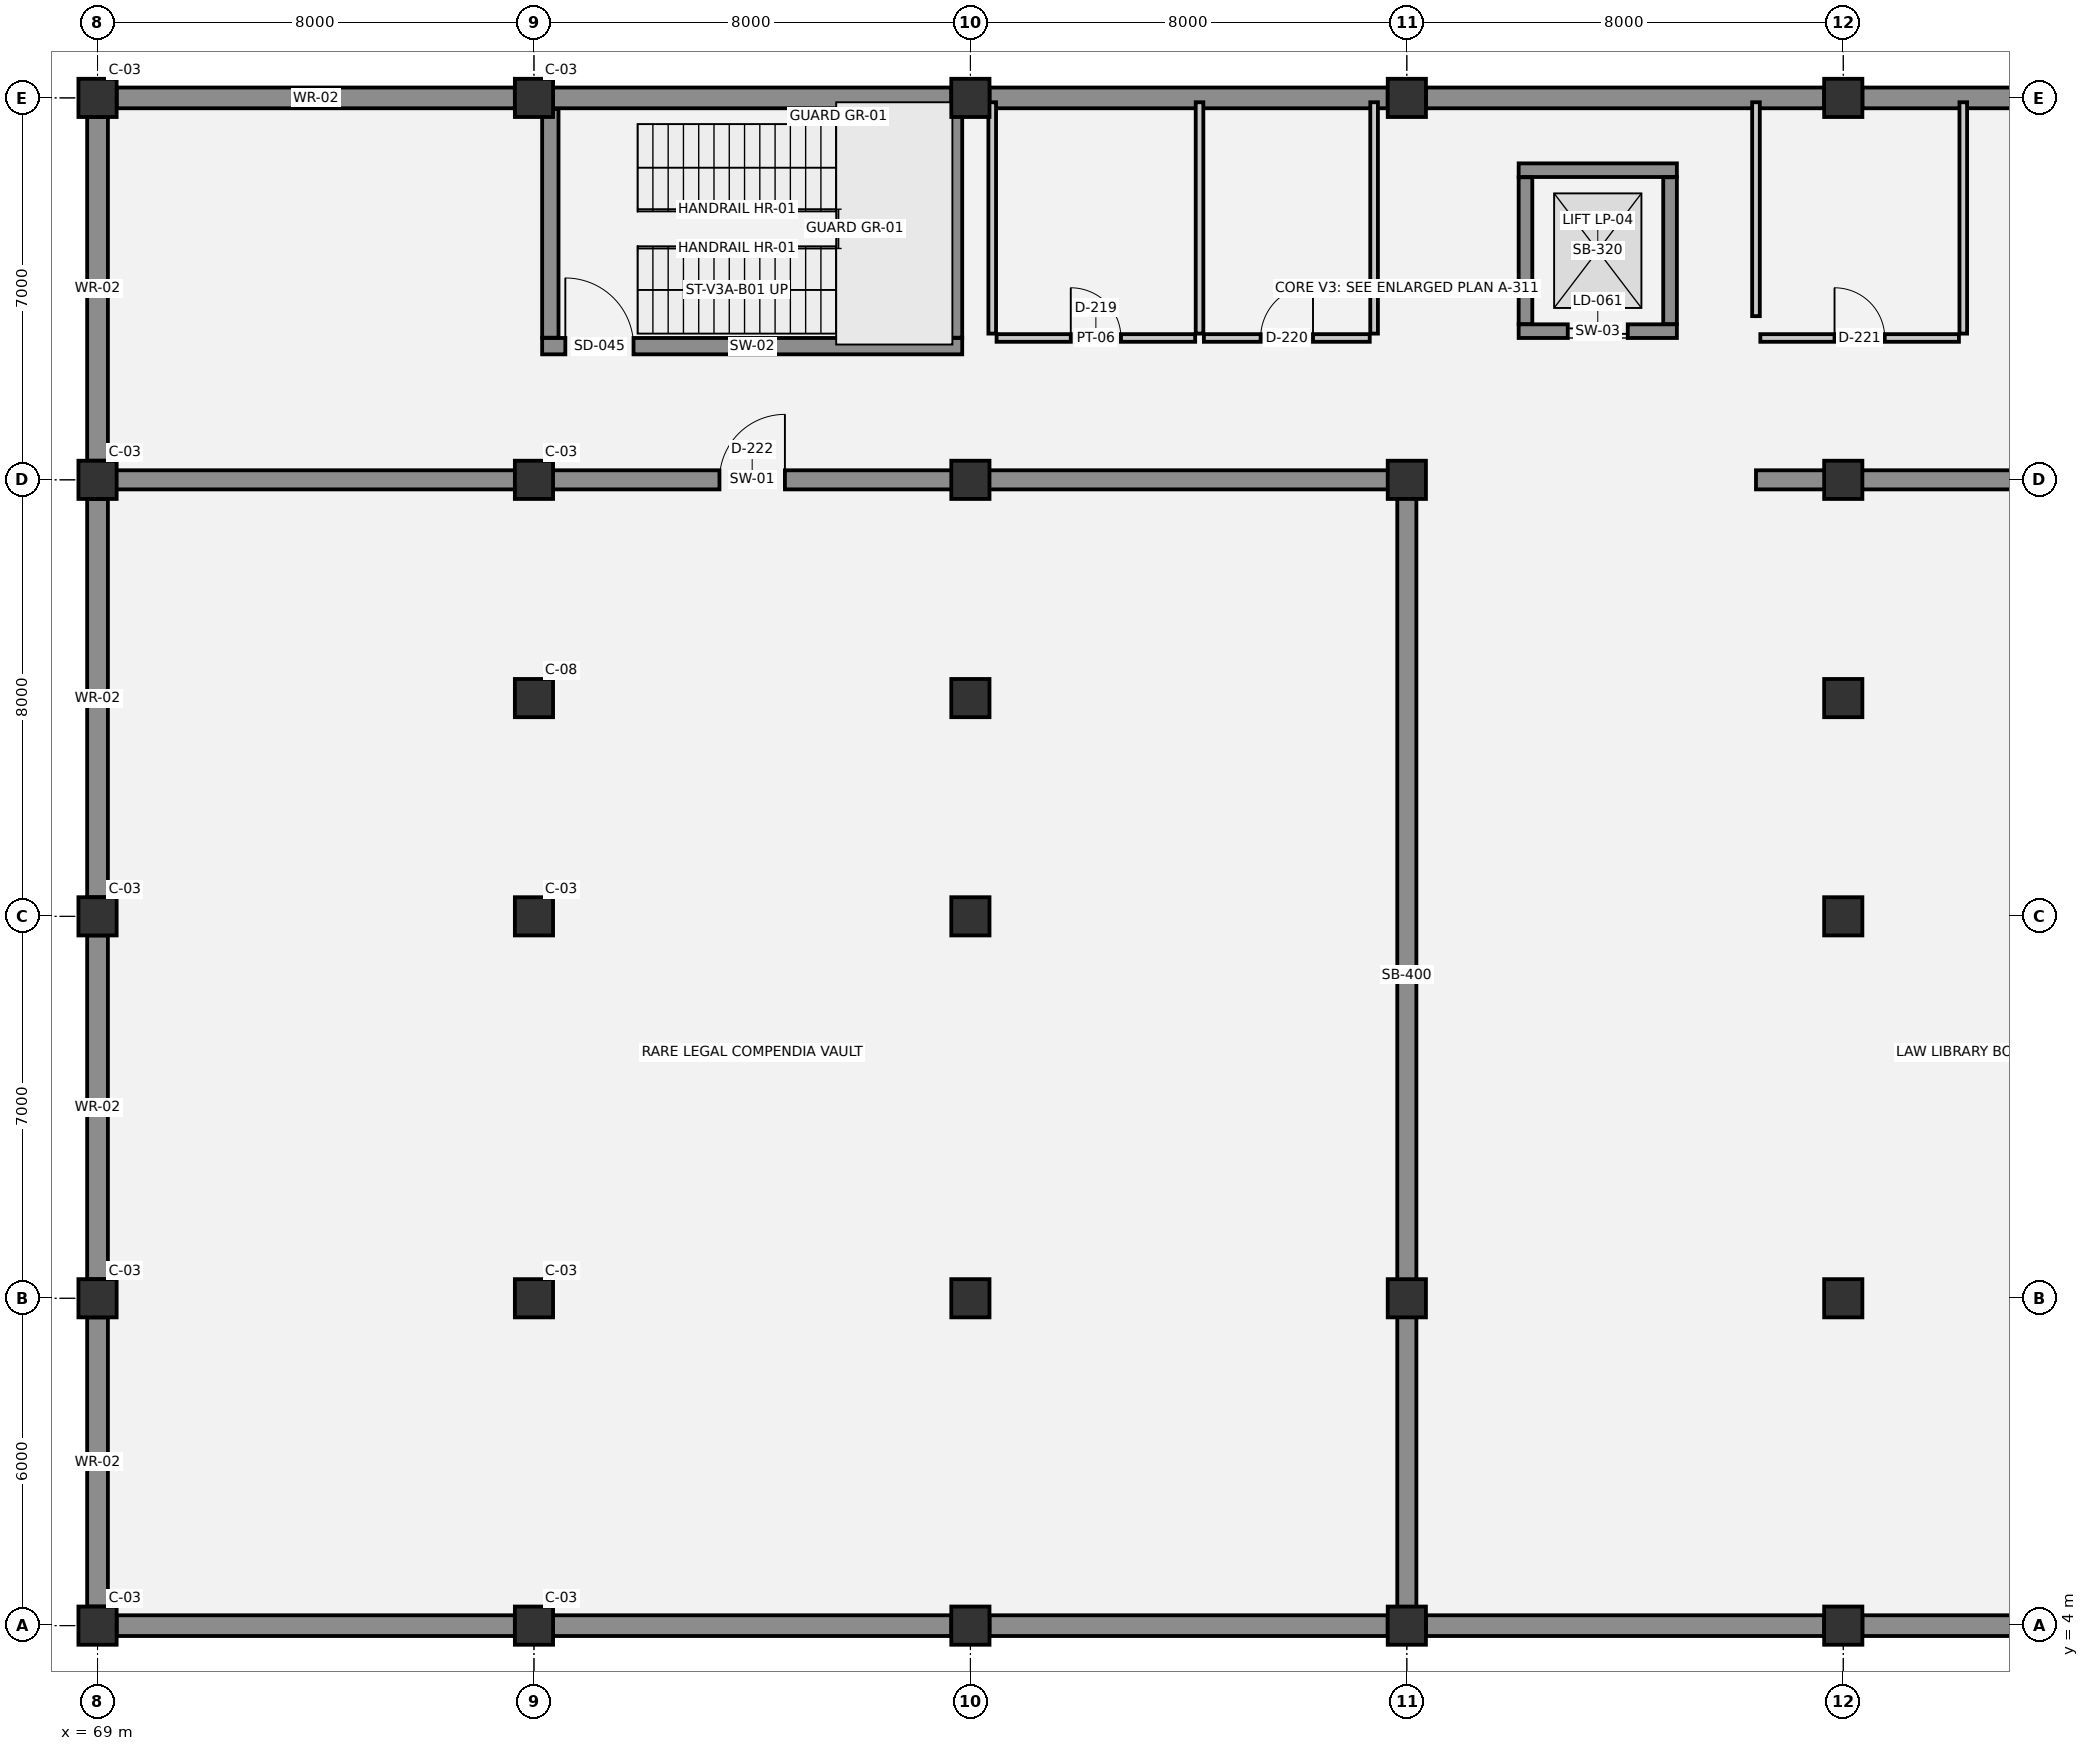
"""IFC4 building model, lengths in metres.
Left out: names, types, materials, properties, quantities, classifications, styles, units other than length and angle.
Written with IfcOpenShell. Run it as: python <this file> out.ifc"""

import sys

from ifc_helpers import new_model, si_unit, direction, frame, frame_2d, origin, origin_2d, place, context, subcontext, project, spatial, rectangle, circle, extrude, element, fill, save


model = new_model("IFC4")
c1 = context("Model", 3, precision=1e-05, world=origin(), true_north=direction((0.0, 1.0)))
c2 = subcontext(c1, "Body", "Model", "MODEL_VIEW")
j1 = project(units=[si_unit("LENGTHUNIT", "METRE"), si_unit("PLANEANGLEUNIT", "RADIAN")], contexts=[c1])
p1 = place(None, origin())
s1 = spatial("IfcSite", under=j1, at=p1, CompositionType="ELEMENT")
p2 = place(p1, origin())
s2 = spatial("IfcBuilding", under=s1, at=p2, CompositionType="ELEMENT")
p3 = place(p2, frame((0.0, 0.0, -4.5)))
s3 = spatial("IfcBuildingStorey", under=s2, at=p3, CompositionType="ELEMENT", Elevation=-4.5)
for number, where, z_axis, x_axis in (
    (1, (69.0, 4.0, 0.0), (0.0, 0.0, 1.0), (1.0, 0.0, 0.0)),
    (2, (69.0, 10.0, 0.0), (0.0, 0.0, 1.0), (1.0, 0.0, 0.0)),
    (3, (69.0, 17.0, 0.0), (0.0, 0.0, 1.0), (1.0, 0.0, 0.0)),
    (4, (69.0, 25.0, 0.0), (0.0, 0.0, 1.0), (1.0, 0.0, 0.0)),
    (5, (69.0, 32.0, 0.0), (0.0, 0.0, 1.0), (1.0, 0.0, 0.0)),
    (6, (77.0, 4.0, 0.0), (0.0, 0.0, 1.0), (1.0, 0.0, 0.0)),
    (7, (77.0, 10.0, 0.0), (0.0, 0.0, 1.0), (1.0, 0.0, 0.0)),
    (8, (77.0, 17.0, 0.0), (0.0, 0.0, 1.0), (1.0, 0.0, 0.0)),
    (9, (77.0, 25.0, 0.0), (0.0, 0.0, 1.0), (1.0, 0.0, 0.0)),
    (10, (77.0, 32.0, 0.0), (0.0, 0.0, 1.0), (1.0, 0.0, 0.0)),
    (11, (85.0, 4.0, 0.0), (0.0, 0.0, 1.0), (1.0, 0.0, 0.0)),
    (12, (85.0, 10.0, 0.0), (0.0, 0.0, 1.0), (1.0, 0.0, 0.0)),
    (13, (85.0, 17.0, 0.0), (0.0, 0.0, 1.0), (1.0, 0.0, 0.0)),
    (14, (85.0, 25.0, 0.0), (0.0, 0.0, 1.0), (1.0, 0.0, 0.0)),
    (15, (85.0, 32.0, 0.0), (0.0, 0.0, 1.0), (1.0, 0.0, 0.0)),
    (16, (93.0, 4.0, 0.0), (0.0, 0.0, 1.0), (1.0, 0.0, 0.0)),
    (17, (93.0, 10.0, 0.0), (0.0, 0.0, 1.0), (1.0, 0.0, 0.0)),
    (18, (93.0, 25.0, 0.0), (0.0, 0.0, 1.0), (1.0, 0.0, 0.0)),
    (19, (93.0, 32.0, 0.0), (0.0, 0.0, 1.0), (1.0, 0.0, 0.0)),
    (20, (101.0, 4.0, 0.0), (0.0, 0.0, 1.0), (1.0, 0.0, 0.0)),
    (21, (101.0, 10.0, 0.0), (0.0, 0.0, 1.0), (1.0, 0.0, 0.0)),
    (22, (101.0, 17.0, 0.0), (0.0, 0.0, 1.0), (1.0, 0.0, 0.0)),
    (23, (101.0, 25.0, 0.0), (0.0, 0.0, 1.0), (1.0, 0.0, 0.0)),
    (24, (101.0, 32.0, 0.0), (0.0, 0.0, 1.0), (1.0, 0.0, 0.0)),
):
    element("IfcColumn", number, at=place(p3, frame(where, z_axis=z_axis, x_axis=x_axis)), inside=s3, PredefinedType="COLUMN", context=c2, shape_type="SweptSolid", body=[
        extrude(rectangle(XDim=0.7, YDim=0.7, at=origin_2d()), origin(), (0.0, 0.0, 1.0), 4.5),
    ])
for number, where, z_axis, x_axis in (
    (25, (77.0, 21.0, 0.0), (0.0, 0.0, 1.0), (1.0, 0.0, 0.0)),
    (26, (85.0, 21.0, 0.0), (0.0, 0.0, 1.0), (1.0, 0.0, 0.0)),
    (27, (101.0, 21.0, 0.0), (0.0, 0.0, 1.0), (1.0, 0.0, 0.0)),
):
    element("IfcColumn", number, at=place(p3, frame(where, z_axis=z_axis, x_axis=x_axis)), inside=s3, PredefinedType="COLUMN", context=c2, shape_type="SweptSolid", body=[
        extrude(circle(Radius=0.35, at=origin_2d()), origin(), (0.0, 0.0, 1.0), 4.5),
    ])
p4 = place(p3, frame((69.0, 4.35, 0.0), z_axis=(0.0, 0.0, 1.0), x_axis=(0.0, 1.0, 0.0)))
e28 = element("IfcWall", 28, at=p4, inside=s3, PredefinedType="STANDARD", context=c2, shape_type="SweptSolid", body=[
    extrude(rectangle(XDim=5.3, YDim=0.38, at=frame_2d((2.65, 0.0))), origin(), (0.0, 0.0, 1.0), 4.16),
])
p5 = place(p3, frame((69.0, 10.35, 0.0), z_axis=(0.0, 0.0, 1.0), x_axis=(0.0, 1.0, 0.0)))
e29 = element("IfcWall", 29, at=p5, inside=s3, PredefinedType="STANDARD", context=c2, shape_type="SweptSolid", body=[
    extrude(rectangle(XDim=6.3, YDim=0.38, at=frame_2d((3.15, 0.0))), origin(), (0.0, 0.0, 1.0), 4.16),
])
p6 = place(p3, frame((69.0, 17.35, 0.0), z_axis=(0.0, 0.0, 1.0), x_axis=(0.0, 1.0, 0.0)))
e30 = element("IfcWall", 30, at=p6, inside=s3, PredefinedType="STANDARD", context=c2, shape_type="SweptSolid", body=[
    extrude(rectangle(XDim=7.3, YDim=0.38, at=frame_2d((3.65, 0.0))), origin(), (0.0, 0.0, 1.0), 4.16),
])
p7 = place(p3, frame((69.0, 25.35, 0.0), z_axis=(0.0, 0.0, 1.0), x_axis=(0.0, 1.0, 0.0)))
e31 = element("IfcWall", 31, at=p7, inside=s3, PredefinedType="STANDARD", context=c2, shape_type="SweptSolid", body=[
    extrude(rectangle(XDim=6.3, YDim=0.38, at=frame_2d((3.15, 0.0))), origin(), (0.0, 0.0, 1.0), 4.16),
])
for number, where, z_axis, x_axis in (
    (32, (69.35, 32.0, 0.0), (0.0, 0.0, 1.0), (1.0, 0.0, 0.0)),
    (33, (77.35, 32.0, 0.0), (0.0, 0.0, 1.0), (1.0, 0.0, 0.0)),
    (34, (85.35, 32.0, 0.0), (0.0, 0.0, 1.0), (1.0, 0.0, 0.0)),
    (35, (93.35, 32.0, 0.0), (0.0, 0.0, 1.0), (1.0, 0.0, 0.0)),
    (36, (101.35, 32.0, 0.0), (0.0, 0.0, 1.0), (1.0, 0.0, 0.0)),
    (37, (108.65, 4.0, 0.0), (0.0, 0.0, 1.0), (-1.0, 0.0, 0.0)),
    (38, (100.65, 4.0, 0.0), (0.0, 0.0, 1.0), (-1.0, 0.0, 0.0)),
    (39, (92.65, 4.0, 0.0), (0.0, 0.0, 1.0), (-1.0, 0.0, 0.0)),
    (40, (84.65, 4.0, 0.0), (0.0, 0.0, 1.0), (-1.0, 0.0, 0.0)),
    (41, (76.65, 4.0, 0.0), (0.0, 0.0, 1.0), (-1.0, 0.0, 0.0)),
):
    element("IfcWall", number, at=place(p3, frame(where, z_axis=z_axis, x_axis=x_axis)), inside=s3, PredefinedType="STANDARD", context=c2, shape_type="SweptSolid", body=[
        extrude(rectangle(XDim=7.3, YDim=0.38, at=frame_2d((3.65, 0.0))), origin(), (0.0, 0.0, 1.0), 4.16),
    ])
p8 = place(p3, frame((95.05, 27.725, 0.0), z_axis=(0.0, 0.0, 1.0), x_axis=(1.0, 0.0, 0.0)))
e42 = element("IfcWall", 42, at=p8, inside=s3, PredefinedType="SHEAR", context=c2, shape_type="SweptSolid", body=[
    extrude(rectangle(XDim=2.9, YDim=0.25, at=frame_2d((1.45, 0.0))), origin(), (0.0, 0.0, 1.0), 4.5),
])
p9 = place(p8, frame((0.9, 0.0, 0.0)))
e43 = element("IfcOpeningElement", 43, at=p9, cuts=e42, PredefinedType="OPENING", context=c2, shape_type="SweptSolid", body=[
    extrude(rectangle(XDim=1.1, YDim=2.15, at=frame_2d((0.55, 1.075))), frame((0.0, 0.135, 0.0), z_axis=(0.0, -1.0, 0.0), x_axis=(1.0, 0.0, 0.0)), (0.0, 0.0, 1.0), 0.27),
])
p10 = place(p3, frame((97.95, 30.675, 0.0), z_axis=(0.0, 0.0, 1.0), x_axis=(-1.0, 0.0, 0.0)))
e44 = element("IfcWall", 44, at=p10, inside=s3, PredefinedType="SHEAR", context=c2, shape_type="SweptSolid", body=[
    extrude(rectangle(XDim=2.9, YDim=0.25, at=frame_2d((1.45, 0.0))), origin(), (0.0, 0.0, 1.0), 4.5),
])
for number, where, z_axis, x_axis in (
    (45, (95.175, 30.545, 0.0), (0.0, 0.0, 1.0), (0.0, -1.0, 0.0)),
    (46, (97.825, 27.855, 0.0), (0.0, 0.0, 1.0), (0.0, 1.0, 0.0)),
):
    element("IfcWall", number, at=place(p3, frame(where, z_axis=z_axis, x_axis=x_axis)), inside=s3, PredefinedType="SHEAR", context=c2, shape_type="SweptSolid", body=[
        extrude(rectangle(XDim=2.69, YDim=0.25, at=frame_2d((1.345, 0.0))), origin(), (0.0, 0.0, 1.0), 4.5),
    ])
p11 = place(p3, frame((77.15, 27.45, 0.0), z_axis=(0.0, 0.0, 1.0), x_axis=(1.0, 0.0, 0.0)))
e47 = element("IfcWall", 47, at=p11, inside=s3, PredefinedType="SHEAR", context=c2, shape_type="SweptSolid", body=[
    extrude(rectangle(XDim=7.7, YDim=0.3, at=frame_2d((3.85, 0.0))), origin(), (0.0, 0.0, 1.0), 4.16),
])
p12 = place(p11, frame((0.425, 0.0, 0.0)))
e48 = element("IfcOpeningElement", 48, at=p12, cuts=e47, PredefinedType="OPENING", context=c2, shape_type="SweptSolid", body=[
    extrude(rectangle(XDim=1.25, YDim=2.15, at=frame_2d((0.625, 1.075))), frame((0.0, 0.16, 0.0), z_axis=(0.0, -1.0, 0.0), x_axis=(1.0, 0.0, 0.0)), (0.0, 0.0, 1.0), 0.32),
])
for number, where, z_axis, x_axis in (
    (49, (77.3, 31.795, 0.0), (0.0, 0.0, 1.0), (0.0, -1.0, 0.0)),
    (50, (84.7, 27.605, 0.0), (0.0, 0.0, 1.0), (0.0, 1.0, 0.0)),
):
    element("IfcWall", number, at=place(p3, frame(where, z_axis=z_axis, x_axis=x_axis)), inside=s3, PredefinedType="SHEAR", context=c2, shape_type="SweptSolid", body=[
        extrude(rectangle(XDim=4.19, YDim=0.3, at=frame_2d((2.095, 0.0))), origin(), (0.0, 0.0, 1.0), 4.16),
    ])
p13 = place(p3, frame((69.08, 25.0, 0.0), z_axis=(0.0, 0.0, 1.0), x_axis=(1.0, 0.0, 0.0)))
e51 = element("IfcWall", 51, at=p13, inside=s3, PredefinedType="SHEAR", context=c2, shape_type="SweptSolid", body=[
    extrude(rectangle(XDim=23.84, YDim=0.35, at=frame_2d((11.92, 0.0))), origin(), (0.0, 0.0, 1.0), 4.14),
])
p14 = place(p13, frame((11.32, 0.0, 0.0)))
e52 = element("IfcOpeningElement", 52, at=p14, cuts=e51, PredefinedType="OPENING", context=c2, shape_type="SweptSolid", body=[
    extrude(rectangle(XDim=1.2, YDim=2.15, at=frame_2d((0.6, 1.075))), frame((0.0, 0.185, 0.0), z_axis=(0.0, -1.0, 0.0), x_axis=(1.0, 0.0, 0.0)), (0.0, 0.0, 1.0), 0.37),
])
p15 = place(p3, frame((99.4, 25.0, 0.0), z_axis=(0.0, 0.0, 1.0), x_axis=(1.0, 0.0, 0.0)))
e53 = element("IfcWall", 53, at=p15, inside=s3, PredefinedType="SHEAR", context=c2, shape_type="SweptSolid", body=[
    extrude(rectangle(XDim=17.52, YDim=0.35, at=frame_2d((8.76, 0.0))), origin(), (0.0, 0.0, 1.0), 4.14),
])
p16 = place(p15, frame((5.817, 0.0, 0.0)))
e54 = element("IfcOpeningElement", 54, at=p16, cuts=e53, PredefinedType="OPENING", context=c2, shape_type="SweptSolid", body=[
    extrude(rectangle(XDim=1.2, YDim=2.15, at=frame_2d((0.6, 1.075))), frame((0.0, 0.185, 0.0), z_axis=(0.0, -1.0, 0.0), x_axis=(1.0, 0.0, 0.0)), (0.0, 0.0, 1.0), 0.37),
])
p17 = place(p3, frame((85.48, 27.6, 0.0), z_axis=(0.0, 0.0, 1.0), x_axis=(1.0, 0.0, 0.0)))
e55 = element("IfcWall", 55, at=p17, inside=s3, PredefinedType="PLUMBINGWALL", context=c2, shape_type="SweptSolid", body=[
    extrude(rectangle(XDim=3.64, YDim=0.14, at=frame_2d((1.82, 0.0))), origin(), (0.0, 0.0, 1.0), 4.14),
])
p18 = place(p17, frame((1.36, 0.0, 0.0)))
e56 = element("IfcOpeningElement", 56, at=p18, cuts=e55, PredefinedType="OPENING", context=c2, shape_type="SweptSolid", body=[
    extrude(rectangle(XDim=0.92, YDim=2.1, at=frame_2d((0.46, 1.05))), frame((0.0, 0.08, 0.0), z_axis=(0.0, -1.0, 0.0), x_axis=(1.0, 0.0, 0.0)), (0.0, 0.0, 1.0), 0.16),
])
p19 = place(p3, frame((89.28, 27.6, 0.0), z_axis=(0.0, 0.0, 1.0), x_axis=(1.0, 0.0, 0.0)))
e57 = element("IfcWall", 57, at=p19, inside=s3, PredefinedType="PLUMBINGWALL", context=c2, shape_type="SweptSolid", body=[
    extrude(rectangle(XDim=3.04, YDim=0.14, at=frame_2d((1.52, 0.0))), origin(), (0.0, 0.0, 1.0), 4.14),
])
p20 = place(p19, frame((1.04, 0.0, 0.0)))
e58 = element("IfcOpeningElement", 58, at=p20, cuts=e57, PredefinedType="OPENING", context=c2, shape_type="SweptSolid", body=[
    extrude(rectangle(XDim=0.96, YDim=2.1, at=frame_2d((0.48, 1.05))), frame((0.0, 0.08, 0.0), z_axis=(0.0, -1.0, 0.0), x_axis=(1.0, 0.0, 0.0)), (0.0, 0.0, 1.0), 0.16),
])
p21 = place(p3, frame((99.48, 27.6, 0.0), z_axis=(0.0, 0.0, 1.0), x_axis=(1.0, 0.0, 0.0)))
e59 = element("IfcWall", 59, at=p21, inside=s3, PredefinedType="PLUMBINGWALL", context=c2, shape_type="SweptSolid", body=[
    extrude(rectangle(XDim=3.64, YDim=0.14, at=frame_2d((1.82, 0.0))), origin(), (0.0, 0.0, 1.0), 4.14),
])
p22 = place(p21, frame((1.36, 0.0, 0.0)))
e60 = element("IfcOpeningElement", 60, at=p22, cuts=e59, PredefinedType="OPENING", context=c2, shape_type="SweptSolid", body=[
    extrude(rectangle(XDim=0.92, YDim=2.1, at=frame_2d((0.46, 1.05))), frame((0.0, 0.08, 0.0), z_axis=(0.0, -1.0, 0.0), x_axis=(1.0, 0.0, 0.0)), (0.0, 0.0, 1.0), 0.16),
])
for number, where, z_axis, x_axis in (
    (61, (85.4, 27.68, 0.0), (0.0, 0.0, 1.0), (0.0, 1.0, 0.0)),
    (62, (89.2, 27.68, 0.0), (0.0, 0.0, 1.0), (0.0, 1.0, 0.0)),
    (63, (92.4, 27.68, 0.0), (0.0, 0.0, 1.0), (0.0, 1.0, 0.0)),
):
    element("IfcWall", number, at=place(p3, frame(where, z_axis=z_axis, x_axis=x_axis)), inside=s3, PredefinedType="PLUMBINGWALL", context=c2, shape_type="SweptSolid", body=[
        extrude(rectangle(XDim=4.24, YDim=0.14, at=frame_2d((2.12, 0.0))), origin(), (0.0, 0.0, 1.0), 4.14),
    ])
p23 = place(p3, frame((93.0, 4.08, 0.0), z_axis=(0.0, 0.0, 1.0), x_axis=(0.0, 1.0, 0.0)))
e64 = element("IfcWall", 64, at=p23, inside=s3, PredefinedType="SHEAR", context=c2, shape_type="SweptSolid", body=[
    extrude(rectangle(XDim=20.84, YDim=0.35, at=frame_2d((10.42, 0.0))), origin(), (0.0, 0.0, 1.0), 4.14),
])
p24 = place(p3, frame((99.4, 28.0, 0.0), z_axis=(0.0, 0.0, 1.0), x_axis=(0.0, 1.0, 0.0)))
e65 = element("IfcWall", 65, at=p24, inside=s3, PredefinedType="PLUMBINGWALL", context=c2, shape_type="SweptSolid", body=[
    extrude(rectangle(XDim=3.92, YDim=0.14, at=frame_2d((1.96, 0.0))), origin(), (0.0, 0.0, 1.0), 4.14),
])
p25 = place(p3, frame((103.2, 27.68, 0.0), z_axis=(0.0, 0.0, 1.0), x_axis=(0.0, 1.0, 0.0)))
e66 = element("IfcWall", 66, at=p25, inside=s3, PredefinedType="PLUMBINGWALL", context=c2, shape_type="SweptSolid", body=[
    extrude(rectangle(XDim=4.24, YDim=0.14, at=frame_2d((2.12, 0.0))), origin(), (0.0, 0.0, 1.0), 4.14),
])
p26 = place(p9, origin())
e67 = element("IfcDoor", 67, at=p26, inside=s3, OperationType="DOUBLE_DOOR_SLIDING", PredefinedType="DOOR", context=c2, shape_type="SweptSolid", body=[
    extrude(rectangle(XDim=1.1, YDim=2.15, at=frame_2d((0.55, 1.075))), frame((0.0, 0.025, 0.0), z_axis=(0.0, -1.0, 0.0), x_axis=(1.0, 0.0, 0.0)), (0.0, 0.0, 1.0), 0.05),
])
fill(e43, e67)
p27 = place(p12, origin())
e68 = element("IfcDoor", 68, at=p27, inside=s3, OperationType="SINGLE_SWING_LEFT", PredefinedType="DOOR", context=c2, shape_type="SweptSolid", body=[
    extrude(rectangle(XDim=1.25, YDim=2.15, at=frame_2d((0.625, 1.075))), frame((0.0, 0.025, 0.0), z_axis=(0.0, -1.0, 0.0), x_axis=(1.0, 0.0, 0.0)), (0.0, 0.0, 1.0), 0.05),
])
fill(e48, e68)
p28 = place(p18, origin())
e69 = element("IfcDoor", 69, at=p28, inside=s3, OperationType="SINGLE_SWING_LEFT", PredefinedType="DOOR", context=c2, shape_type="SweptSolid", body=[
    extrude(rectangle(XDim=0.92, YDim=2.1, at=frame_2d((0.46, 1.05))), frame((0.0, 0.025, 0.0), z_axis=(0.0, -1.0, 0.0), x_axis=(1.0, 0.0, 0.0)), (0.0, 0.0, 1.0), 0.05),
])
fill(e56, e69)
p29 = place(p20, origin())
e70 = element("IfcDoor", 70, at=p29, inside=s3, OperationType="SINGLE_SWING_RIGHT", PredefinedType="DOOR", context=c2, shape_type="SweptSolid", body=[
    extrude(rectangle(XDim=0.96, YDim=2.1, at=frame_2d((0.48, 1.05))), frame((0.0, 0.025, 0.0), z_axis=(0.0, -1.0, 0.0), x_axis=(1.0, 0.0, 0.0)), (0.0, 0.0, 1.0), 0.05),
])
fill(e58, e70)
p30 = place(p22, origin())
e71 = element("IfcDoor", 71, at=p30, inside=s3, OperationType="SINGLE_SWING_LEFT", PredefinedType="DOOR", context=c2, shape_type="SweptSolid", body=[
    extrude(rectangle(XDim=0.92, YDim=2.1, at=frame_2d((0.46, 1.05))), frame((0.0, 0.025, 0.0), z_axis=(0.0, -1.0, 0.0), x_axis=(1.0, 0.0, 0.0)), (0.0, 0.0, 1.0), 0.05),
])
fill(e60, e71)
p31 = place(p14, origin())
e72 = element("IfcDoor", 72, at=p31, inside=s3, OperationType="SINGLE_SWING_RIGHT", PredefinedType="DOOR", context=c2, shape_type="SweptSolid", body=[
    extrude(rectangle(XDim=1.2, YDim=2.15, at=frame_2d((0.6, 1.075))), frame((0.0, 0.025, 0.0), z_axis=(0.0, -1.0, 0.0), x_axis=(1.0, 0.0, 0.0)), (0.0, 0.0, 1.0), 0.05),
])
fill(e52, e72)
save(model, sys.argv[1])
